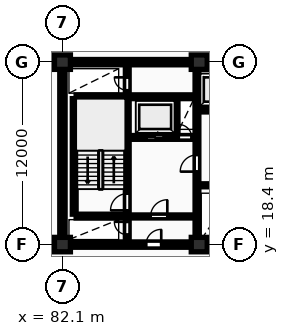
"""IFC4 building model, lengths in metres.
Left out: names, types, materials, properties, quantities, classifications, styles, units other than length and angle.
Written with IfcOpenShell. Run it as: python <this file> out.ifc"""

import sys

from ifc_helpers import new_model, si_unit, direction, frame, frame_2d, origin, origin_2d, place, context, subcontext, project, spatial, rectangle, extrude, element, fill, save


model = new_model("IFC4")
c1 = context("Model", 3, precision=1e-05, world=origin(), true_north=direction((0.0, 1.0)))
c2 = subcontext(c1, "Body", "Model", "MODEL_VIEW")
j1 = project(units=[si_unit("LENGTHUNIT", "METRE"), si_unit("PLANEANGLEUNIT", "RADIAN")], contexts=[c1])
p1 = place(None, origin())
s1 = spatial("IfcSite", under=j1, at=p1, CompositionType="ELEMENT")
p2 = place(p1, origin())
s2 = spatial("IfcBuilding", under=s1, at=p2, CompositionType="ELEMENT")
p3 = place(p2, frame((0.0, 0.0, -7.2)))
s3 = spatial("IfcBuildingStorey", under=s2, at=p3, CompositionType="ELEMENT", Elevation=-7.2)
for number, where, z_axis, x_axis in (
    (1, (82.1, 18.4, 0.0), (0.0, 0.0, 1.0), (1.0, 0.0, 0.0)),
    (2, (82.1, 30.4, 0.0), (0.0, 0.0, 1.0), (1.0, 0.0, 0.0)),
    (3, (91.1, 18.4, 0.0), (0.0, 0.0, 1.0), (1.0, 0.0, 0.0)),
    (4, (91.1, 30.4, 0.0), (0.0, 0.0, 1.0), (1.0, 0.0, 0.0)),
):
    element("IfcColumn", number, at=place(p3, frame(where, z_axis=z_axis, x_axis=x_axis)), inside=s3, PredefinedType="COLUMN", context=c2, shape_type="SweptSolid", body=[
        extrude(rectangle(XDim=1.05, YDim=0.95, at=origin_2d()), origin(), (0.0, 0.0, 1.0), 3.6),
    ])
p4 = place(p3, frame((81.925, 30.4, 0.0), z_axis=(0.0, 0.0, 1.0), x_axis=(1.0, 0.0, 0.0)))
e5 = element("IfcWall", 5, at=p4, inside=s3, PredefinedType="SHEAR", context=c2, shape_type="SweptSolid", body=[
    extrude(rectangle(XDim=36.265, YDim=0.35, at=frame_2d((18.132, 0.0))), origin(), (0.0, 0.0, 1.0), 3.6),
])
p5 = place(p3, frame((82.1, 18.575, 0.0), z_axis=(0.0, 0.0, 1.0), x_axis=(0.0, 1.0, 0.0)))
e6 = element("IfcWall", 6, at=p5, inside=s3, PredefinedType="SHEAR", context=c2, shape_type="SweptSolid", body=[
    extrude(rectangle(XDim=11.65, YDim=0.35, at=frame_2d((5.825, 0.0))), origin(), (0.0, 0.0, 1.0), 3.6),
])
p6 = place(p3, frame((81.925, 18.4, 0.0), z_axis=(0.0, 0.0, 1.0), x_axis=(1.0, 0.0, 0.0)))
e7 = element("IfcWall", 7, at=p6, inside=s3, PredefinedType="SHEAR", context=c2, shape_type="SweptSolid", body=[
    extrude(rectangle(XDim=36.265, YDim=0.35, at=frame_2d((18.132, 0.0))), origin(), (0.0, 0.0, 1.0), 3.6),
])
p7 = place(p6, frame((5.675, 0.0, 0.0)))
e8 = element("IfcOpeningElement", 8, at=p7, cuts=e7, PredefinedType="OPENING", context=c2, shape_type="SweptSolid", body=[
    extrude(rectangle(XDim=1.0, YDim=2.15, at=frame_2d((0.5, 1.075))), frame((0.0, 0.185, 0.0), z_axis=(0.0, -1.0, 0.0), x_axis=(1.0, 0.0, 0.0)), (0.0, 0.0, 1.0), 0.37),
])
p8 = place(p6, frame((21.925, 0.0, 0.0)))
e9 = element("IfcOpeningElement", 9, at=p8, cuts=e7, PredefinedType="OPENING", context=c2, shape_type="SweptSolid", body=[
    extrude(rectangle(XDim=1.5, YDim=2.2, at=frame_2d((0.75, 1.1))), frame((0.0, 0.185, 0.0), z_axis=(0.0, -1.0, 0.0), x_axis=(1.0, 0.0, 0.0)), (0.0, 0.0, 1.0), 0.37),
])
p9 = place(p6, frame((29.875, 0.0, 0.0)))
e10 = element("IfcOpeningElement", 10, at=p9, cuts=e7, PredefinedType="OPENING", context=c2, shape_type="SweptSolid", body=[
    extrude(rectangle(XDim=1.0, YDim=2.15, at=frame_2d((0.5, 1.075))), frame((0.0, 0.185, 0.0), z_axis=(0.0, -1.0, 0.0), x_axis=(1.0, 0.0, 0.0)), (0.0, 0.0, 1.0), 0.37),
])
p10 = place(p3, frame((82.875, 20.4, 0.0), z_axis=(0.0, 0.0, 1.0), x_axis=(0.0, 1.0, 0.0)))
e11 = element("IfcWall", 11, at=p10, inside=s3, PredefinedType="SHEAR", context=c2, shape_type="SweptSolid", body=[
    extrude(rectangle(XDim=7.6, YDim=0.25, at=frame_2d((3.8, 0.0))), origin(), (0.0, 0.0, 1.0), 3.6),
])
p11 = place(p3, frame((86.365, 18.6, 0.0), z_axis=(0.0, 0.0, 1.0), x_axis=(0.0, 1.0, 0.0)))
e12 = element("IfcWall", 12, at=p11, inside=s3, PredefinedType="SHEAR", context=c2, shape_type="SweptSolid", body=[
    extrude(rectangle(XDim=11.6, YDim=0.25, at=frame_2d((5.8, 0.0))), origin(), (0.0, 0.0, 1.0), 3.6),
])
p12 = place(p11, frame((0.45, 0.0, 0.0)))
e13 = element("IfcOpeningElement", 13, at=p12, cuts=e12, PredefinedType="OPENING", context=c2, shape_type="SweptSolid", body=[
    extrude(rectangle(XDim=0.85, YDim=2.05, at=frame_2d((0.425, 1.025))), frame((0.0, 0.135, 0.0), z_axis=(0.0, -1.0, 0.0), x_axis=(1.0, 0.0, 0.0)), (0.0, 0.0, 1.0), 0.27),
])
p13 = place(p11, frame((2.05, 0.0, 0.0)))
e14 = element("IfcOpeningElement", 14, at=p13, cuts=e12, PredefinedType="OPENING", context=c2, shape_type="SweptSolid", body=[
    extrude(rectangle(XDim=1.1, YDim=2.1, at=frame_2d((0.55, 1.05))), frame((0.0, 0.135, 0.0), z_axis=(0.0, -1.0, 0.0), x_axis=(1.0, 0.0, 0.0)), (0.0, 0.0, 1.0), 0.27),
])
p14 = place(p11, frame((9.95, 0.0, 0.0)))
e15 = element("IfcOpeningElement", 15, at=p14, cuts=e12, PredefinedType="OPENING", context=c2, shape_type="SweptSolid", body=[
    extrude(rectangle(XDim=0.85, YDim=2.05, at=frame_2d((0.425, 1.025))), frame((0.0, 0.135, 0.0), z_axis=(0.0, -1.0, 0.0), x_axis=(1.0, 0.0, 0.0)), (0.0, 0.0, 1.0), 0.27),
])
p15 = place(p3, frame((83.0, 20.275, 0.0), z_axis=(0.0, 0.0, 1.0), x_axis=(1.0, 0.0, 0.0)))
e16 = element("IfcWall", 16, at=p15, inside=s3, PredefinedType="SHEAR", context=c2, shape_type="SweptSolid", body=[
    extrude(rectangle(XDim=3.24, YDim=0.25, at=frame_2d((1.62, 0.0))), origin(), (0.0, 0.0, 1.0), 3.6),
])
p16 = place(p3, frame((83.0, 28.125, 0.0), z_axis=(0.0, 0.0, 1.0), x_axis=(1.0, 0.0, 0.0)))
e17 = element("IfcWall", 17, at=p16, inside=s3, PredefinedType="SHEAR", context=c2, shape_type="SweptSolid", body=[
    extrude(rectangle(XDim=7.82, YDim=0.25, at=frame_2d((3.91, 0.0))), origin(), (0.0, 0.0, 1.0), 3.6),
])
p17 = place(p3, frame((86.5, 25.45, 0.0), z_axis=(0.0, 0.0, 1.0), x_axis=(1.0, 0.0, 0.0)))
e18 = element("IfcWall", 18, at=p17, inside=s3, PredefinedType="SHEAR", context=c2, shape_type="SweptSolid", body=[
    extrude(rectangle(XDim=4.32, YDim=0.25, at=frame_2d((2.16, 0.0))), origin(), (0.0, 0.0, 1.0), 3.6),
])
p18 = place(p17, frame((1.14, 0.0, 0.0)))
e19 = element("IfcOpeningElement", 19, at=p18, cuts=e18, PredefinedType="OPENING", context=c2, shape_type="SweptSolid", body=[
    extrude(rectangle(XDim=1.12, YDim=2.12, at=frame_2d((0.56, 1.06))), frame((0.0, 0.135, 0.0), z_axis=(0.0, -1.0, 0.0), x_axis=(1.0, 0.0, 0.0)), (0.0, 0.0, 1.0), 0.27),
])
p19 = place(p17, frame((3.25, 0.0, 0.0)))
e20 = element("IfcOpeningElement", 20, at=p19, cuts=e18, PredefinedType="OPENING", context=c2, shape_type="SweptSolid", body=[
    extrude(rectangle(XDim=0.85, YDim=2.05, at=frame_2d((0.425, 1.025))), frame((0.0, 0.135, 0.0), z_axis=(0.0, -1.0, 0.0), x_axis=(1.0, 0.0, 0.0)), (0.0, 0.0, 1.0), 0.27),
])
p20 = place(p3, frame((89.6, 25.58, 0.0), z_axis=(0.0, 0.0, 1.0), x_axis=(0.0, 1.0, 0.0)))
e21 = element("IfcWall", 21, at=p20, inside=s3, PredefinedType="PARTITIONING", context=c2, shape_type="SweptSolid", body=[
    extrude(rectangle(XDim=2.42, YDim=0.2, at=frame_2d((1.21, 0.0))), origin(), (0.0, 0.0, 1.0), 3.3),
])
p21 = place(p3, frame((86.5, 20.25, 0.0), z_axis=(0.0, 0.0, 1.0), x_axis=(1.0, 0.0, 0.0)))
e22 = element("IfcWall", 22, at=p21, inside=s3, PredefinedType="PARTITIONING", context=c2, shape_type="SweptSolid", body=[
    extrude(rectangle(XDim=4.32, YDim=0.2, at=frame_2d((2.16, 0.0))), origin(), (0.0, 0.0, 1.0), 3.3),
])
p22 = place(p21, frame((1.4, 0.0, 0.0)))
e23 = element("IfcOpeningElement", 23, at=p22, cuts=e22, PredefinedType="OPENING", context=c2, shape_type="SweptSolid", body=[
    extrude(rectangle(XDim=1.1, YDim=2.1, at=frame_2d((0.55, 1.05))), frame((0.0, 0.11, 0.0), z_axis=(0.0, -1.0, 0.0), x_axis=(1.0, 0.0, 0.0)), (0.0, 0.0, 1.0), 0.22),
])
p23 = place(p3, frame((90.95, 18.6, 0.0), z_axis=(0.0, 0.0, 1.0), x_axis=(0.0, 1.0, 0.0)))
e24 = element("IfcWall", 24, at=p23, inside=s3, PredefinedType="SHEAR", context=c2, shape_type="SweptSolid", body=[
    extrude(rectangle(XDim=11.6, YDim=0.25, at=frame_2d((5.8, 0.0))), origin(), (0.0, 0.0, 1.0), 3.6),
])
p24 = place(p23, frame((4.6, 0.0, 0.0)))
e25 = element("IfcOpeningElement", 25, at=p24, cuts=e24, PredefinedType="OPENING", context=c2, shape_type="SweptSolid", body=[
    extrude(rectangle(XDim=1.1, YDim=2.1, at=frame_2d((0.55, 1.05))), frame((0.0, 0.135, 0.0), z_axis=(0.0, -1.0, 0.0), x_axis=(1.0, 0.0, 0.0)), (0.0, 0.0, 1.0), 0.27),
])
p25 = place(p3, frame((91.08, 27.25, 0.0), z_axis=(0.0, 0.0, 1.0), x_axis=(1.0, 0.0, 0.0)))
e26 = element("IfcWall", 26, at=p25, inside=s3, PredefinedType="SHEAR", context=c2, shape_type="SweptSolid", body=[
    extrude(rectangle(XDim=8.34, YDim=0.25, at=frame_2d((4.17, 0.0))), origin(), (0.0, 0.0, 1.0), 3.6),
])
p26 = place(p25, frame((0.76, 0.0, 0.0)))
e27 = element("IfcOpeningElement", 27, at=p26, cuts=e26, PredefinedType="OPENING", context=c2, shape_type="SweptSolid", body=[
    extrude(rectangle(XDim=1.12, YDim=2.12, at=frame_2d((0.56, 1.06))), frame((0.0, 0.135, 0.0), z_axis=(0.0, -1.0, 0.0), x_axis=(1.0, 0.0, 0.0)), (0.0, 0.0, 1.0), 0.27),
])
p27 = place(p25, frame((3.56, 0.0, 0.0)))
e28 = element("IfcOpeningElement", 28, at=p27, cuts=e26, PredefinedType="OPENING", context=c2, shape_type="SweptSolid", body=[
    extrude(rectangle(XDim=1.12, YDim=2.12, at=frame_2d((0.56, 1.06))), frame((0.0, 0.135, 0.0), z_axis=(0.0, -1.0, 0.0), x_axis=(1.0, 0.0, 0.0)), (0.0, 0.0, 1.0), 0.27),
])
p28 = place(p25, frame((6.36, 0.0, 0.0)))
e29 = element("IfcOpeningElement", 29, at=p28, cuts=e26, PredefinedType="OPENING", context=c2, shape_type="SweptSolid", body=[
    extrude(rectangle(XDim=1.12, YDim=2.12, at=frame_2d((0.56, 1.06))), frame((0.0, 0.135, 0.0), z_axis=(0.0, -1.0, 0.0), x_axis=(1.0, 0.0, 0.0)), (0.0, 0.0, 1.0), 0.27),
])
p29 = place(p3, frame((91.08, 22.3, 0.0), z_axis=(0.0, 0.0, 1.0), x_axis=(1.0, 0.0, 0.0)))
e30 = element("IfcWall", 30, at=p29, inside=s3, PredefinedType="PARTITIONING", context=c2, shape_type="SweptSolid", body=[
    extrude(rectangle(XDim=19.14, YDim=0.2, at=frame_2d((9.57, 0.0))), origin(), (0.0, 0.0, 1.0), 3.3),
])
p30 = place(p29, frame((1.15, 0.0, 0.0)))
e31 = element("IfcOpeningElement", 31, at=p30, cuts=e30, PredefinedType="OPENING", context=c2, shape_type="SweptSolid", body=[
    extrude(rectangle(XDim=0.85, YDim=2.05, at=frame_2d((0.425, 1.025))), frame((0.0, 0.11, 0.0), z_axis=(0.0, -1.0, 0.0), x_axis=(1.0, 0.0, 0.0)), (0.0, 0.0, 1.0), 0.22),
])
p31 = place(p29, frame((3.2, 0.0, 0.0)))
e32 = element("IfcOpeningElement", 32, at=p31, cuts=e30, PredefinedType="OPENING", context=c2, shape_type="SweptSolid", body=[
    extrude(rectangle(XDim=0.85, YDim=2.05, at=frame_2d((0.425, 1.025))), frame((0.0, 0.11, 0.0), z_axis=(0.0, -1.0, 0.0), x_axis=(1.0, 0.0, 0.0)), (0.0, 0.0, 1.0), 0.22),
])
p32 = place(p29, frame((12.72, 0.0, 0.0)))
e33 = element("IfcOpeningElement", 33, at=p32, cuts=e30, PredefinedType="OPENING", context=c2, shape_type="SweptSolid", body=[
    extrude(rectangle(XDim=1.5, YDim=2.2, at=frame_2d((0.75, 1.1))), frame((0.0, 0.11, 0.0), z_axis=(0.0, -1.0, 0.0), x_axis=(1.0, 0.0, 0.0)), (0.0, 0.0, 1.0), 0.22),
])
p33 = place(p29, frame((6.42, 0.0, 0.0)))
e34 = element("IfcOpeningElement", 34, at=p33, cuts=e30, PredefinedType="OPENING", context=c2, shape_type="SweptSolid", body=[
    extrude(rectangle(XDim=0.92, YDim=2.08, at=frame_2d((0.46, 1.04))), frame((0.0, 0.11, 0.0), z_axis=(0.0, -1.0, 0.0), x_axis=(1.0, 0.0, 0.0)), (0.0, 0.0, 1.0), 0.22),
])
p34 = place(p29, frame((15.92, 0.0, 0.0)))
e35 = element("IfcOpeningElement", 35, at=p34, cuts=e30, PredefinedType="OPENING", context=c2, shape_type="SweptSolid", body=[
    extrude(rectangle(XDim=0.88, YDim=2.06, at=frame_2d((0.44, 1.03))), frame((0.0, 0.11, 0.0), z_axis=(0.0, -1.0, 0.0), x_axis=(1.0, 0.0, 0.0)), (0.0, 0.0, 1.0), 0.22),
])
p35 = place(p7, origin())
e36 = element("IfcDoor", 36, at=p35, inside=s3, OperationType="SINGLE_SWING_RIGHT", PredefinedType="DOOR", context=c2, shape_type="SweptSolid", body=[
    extrude(rectangle(XDim=1.0, YDim=2.15, at=frame_2d((0.5, 1.075))), frame((0.0, 0.025, 0.0), z_axis=(0.0, -1.0, 0.0), x_axis=(1.0, 0.0, 0.0)), (0.0, 0.0, 1.0), 0.05),
])
fill(e8, e36)
p36 = place(p12, origin())
e37 = element("IfcDoor", 37, at=p36, inside=s3, OperationType="SINGLE_SWING_RIGHT", PredefinedType="DOOR", context=c2, shape_type="SweptSolid", body=[
    extrude(rectangle(XDim=0.85, YDim=2.05, at=frame_2d((0.425, 1.025))), frame((0.0, 0.025, 0.0), z_axis=(0.0, -1.0, 0.0), x_axis=(1.0, 0.0, 0.0)), (0.0, 0.0, 1.0), 0.05),
])
fill(e13, e37)
p37 = place(p13, origin())
e38 = element("IfcDoor", 38, at=p37, inside=s3, OperationType="SINGLE_SWING_LEFT", PredefinedType="DOOR", context=c2, shape_type="SweptSolid", body=[
    extrude(rectangle(XDim=1.1, YDim=2.1, at=frame_2d((0.55, 1.05))), frame((0.0, 0.025, 0.0), z_axis=(0.0, -1.0, 0.0), x_axis=(1.0, 0.0, 0.0)), (0.0, 0.0, 1.0), 0.05),
])
fill(e14, e38)
p38 = place(p14, origin())
e39 = element("IfcDoor", 39, at=p38, inside=s3, OperationType="SINGLE_SWING_RIGHT", PredefinedType="DOOR", context=c2, shape_type="SweptSolid", body=[
    extrude(rectangle(XDim=0.85, YDim=2.05, at=frame_2d((0.425, 1.025))), frame((0.0, 0.025, 0.0), z_axis=(0.0, -1.0, 0.0), x_axis=(1.0, 0.0, 0.0)), (0.0, 0.0, 1.0), 0.05),
])
fill(e15, e39)
p39 = place(p18, origin())
e40 = element("IfcDoor", 40, at=p39, inside=s3, OperationType="SLIDING_TO_RIGHT", PredefinedType="DOOR", context=c2, shape_type="SweptSolid", body=[
    extrude(rectangle(XDim=1.12, YDim=2.12, at=frame_2d((0.56, 1.06))), frame((0.0, 0.025, 0.0), z_axis=(0.0, -1.0, 0.0), x_axis=(1.0, 0.0, 0.0)), (0.0, 0.0, 1.0), 0.05),
])
fill(e19, e40)
p40 = place(p19, origin())
e41 = element("IfcDoor", 41, at=p40, inside=s3, OperationType="SINGLE_SWING_LEFT", PredefinedType="DOOR", context=c2, shape_type="SweptSolid", body=[
    extrude(rectangle(XDim=0.85, YDim=2.05, at=frame_2d((0.425, 1.025))), frame((0.0, 0.025, 0.0), z_axis=(0.0, -1.0, 0.0), x_axis=(1.0, 0.0, 0.0)), (0.0, 0.0, 1.0), 0.05),
])
fill(e20, e41)
p41 = place(p22, origin())
e42 = element("IfcDoor", 42, at=p41, inside=s3, OperationType="SINGLE_SWING_RIGHT", PredefinedType="DOOR", context=c2, shape_type="SweptSolid", body=[
    extrude(rectangle(XDim=1.1, YDim=2.1, at=frame_2d((0.55, 1.05))), frame((0.0, 0.025, 0.0), z_axis=(0.0, -1.0, 0.0), x_axis=(1.0, 0.0, 0.0)), (0.0, 0.0, 1.0), 0.05),
])
fill(e23, e42)
p42 = place(p24, origin())
e43 = element("IfcDoor", 43, at=p42, inside=s3, OperationType="SINGLE_SWING_LEFT", PredefinedType="DOOR", context=c2, shape_type="SweptSolid", body=[
    extrude(rectangle(XDim=1.1, YDim=2.1, at=frame_2d((0.55, 1.05))), frame((0.0, 0.025, 0.0), z_axis=(0.0, -1.0, 0.0), x_axis=(1.0, 0.0, 0.0)), (0.0, 0.0, 1.0), 0.05),
])
fill(e25, e43)
save(model, sys.argv[1])
